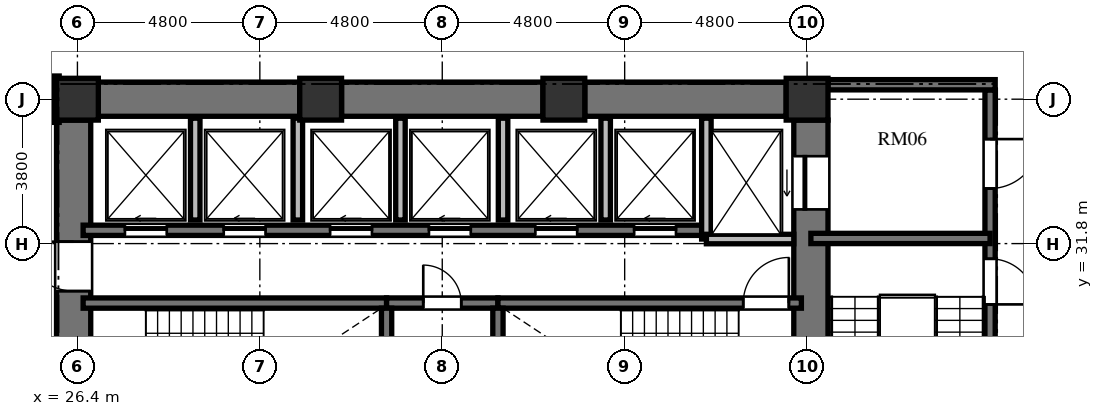
"""IFC4 building model, lengths in metres.
Left out: names, types, materials, properties, quantities, classifications, styles, units other than length and angle.
Written with IfcOpenShell. Run it as: python <this file> out.ifc"""

import sys

from ifc_helpers import new_model, si_unit, direction, frame, frame_2d, origin, origin_2d, place, context, subcontext, project, spatial, rectangle, extrude, element, fill, save


model = new_model("IFC4")
c1 = context("Model", 3, precision=1e-05, world=origin(), true_north=direction((0.0, 1.0)))
c2 = subcontext(c1, "Body", "Model", "MODEL_VIEW")
j1 = project(units=[si_unit("LENGTHUNIT", "METRE"), si_unit("PLANEANGLEUNIT", "RADIAN")], contexts=[c1])
p1 = place(None, origin())
s1 = spatial("IfcSite", under=j1, at=p1, CompositionType="ELEMENT")
p2 = place(p1, origin())
s2 = spatial("IfcBuilding", under=s1, at=p2, CompositionType="ELEMENT")
p3 = place(p2, frame((0.0, 0.0, 68.976)))
s3 = spatial("IfcBuildingStorey", under=s2, at=p3, CompositionType="ELEMENT", Elevation=68.976)
for number, where, z_axis, x_axis in (
    (1, (45.6, 35.6, 0.0), (0.0, 0.0, 1.0), (1.0, 0.0, 0.0)),
    (2, (39.2, 35.6, 0.0), (0.0, 0.0, 1.0), (1.0, 0.0, 0.0)),
    (3, (32.8, 35.6, 0.0), (0.0, 0.0, 1.0), (1.0, 0.0, 0.0)),
    (4, (26.4, 35.6, 0.0), (0.0, 0.0, 1.0), (1.0, 0.0, 0.0)),
):
    element("IfcColumn", number, at=place(p3, frame(where, z_axis=z_axis, x_axis=x_axis)), inside=s3, PredefinedType="COLUMN", context=c2, shape_type="SweptSolid", body=[
        extrude(rectangle(XDim=1.1, YDim=1.1, at=origin_2d()), origin(), (0.0, 0.0, 1.0), 3.648),
    ])
p4 = place(p3, frame((26.3, 20.95, 0.0), z_axis=(0.0, 0.0, 1.0), x_axis=(0.0, 1.0, 0.0)))
e5 = element("IfcWall", 5, at=p4, inside=s3, PredefinedType="SHEAR", context=c2, shape_type="SweptSolid", body=[
    extrude(rectangle(XDim=14.1, YDim=0.9, at=frame_2d((7.05, 0.0))), origin(), (0.0, 0.0, 1.0), 3.648),
])
p5 = place(p4, frame((6.5, 0.0, 0.0)))
e6 = element("IfcOpeningElement", 6, at=p5, cuts=e5, PredefinedType="OPENING", context=c2, shape_type="SweptSolid", body=[
    extrude(rectangle(XDim=1.2, YDim=2.15, at=frame_2d((0.6, 1.075))), frame((0.0, 0.46, 0.0), z_axis=(0.0, -1.0, 0.0), x_axis=(1.0, 0.0, 0.0)), (0.0, 0.0, 1.0), 0.92),
])
p6 = place(p4, frame((9.6, 0.0, 0.0)))
e7 = element("IfcOpeningElement", 7, at=p6, cuts=e5, PredefinedType="OPENING", context=c2, shape_type="SweptSolid", body=[
    extrude(rectangle(XDim=1.3, YDim=2.2, at=frame_2d((0.65, 1.1))), frame((0.0, 0.46, 0.0), z_axis=(0.0, -1.0, 0.0), x_axis=(1.0, 0.0, 0.0)), (0.0, 0.0, 1.0), 0.92),
])
p7 = place(p4, frame((3.26, 0.0, 0.0)))
e8 = element("IfcOpeningElement", 8, at=p7, cuts=e5, PredefinedType="OPENING", context=c2, shape_type="SweptSolid", body=[
    extrude(rectangle(XDim=1.3, YDim=2.2, at=frame_2d((0.65, 1.1))), frame((0.0, 0.46, 0.0), z_axis=(0.0, -1.0, 0.0), x_axis=(1.0, 0.0, 0.0)), (0.0, 0.0, 1.0), 0.92),
])
p8 = place(p3, frame((45.7, 20.95, 0.0), z_axis=(0.0, 0.0, 1.0), x_axis=(0.0, 1.0, 0.0)))
e9 = element("IfcWall", 9, at=p8, inside=s3, PredefinedType="SHEAR", context=c2, shape_type="SweptSolid", body=[
    extrude(rectangle(XDim=14.1, YDim=0.9, at=frame_2d((7.05, 0.0))), origin(), (0.0, 0.0, 1.0), 3.648),
])
p9 = place(p8, frame((11.75, 0.0, 0.0)))
e10 = element("IfcOpeningElement", 10, at=p9, cuts=e9, PredefinedType="OPENING", context=c2, shape_type="SweptSolid", body=[
    extrude(rectangle(XDim=1.4, YDim=2.3, at=frame_2d((0.7, 1.15))), frame((0.0, 0.46, 0.0), z_axis=(0.0, -1.0, 0.0), x_axis=(1.0, 0.0, 0.0)), (0.0, 0.0, 1.0), 0.92),
])
p10 = place(p8, frame((0.95, 0.0, 0.0)))
e11 = element("IfcOpeningElement", 11, at=p10, cuts=e9, PredefinedType="OPENING", context=c2, shape_type="SweptSolid", body=[
    extrude(rectangle(XDim=1.4, YDim=2.3, at=frame_2d((0.7, 1.15))), frame((0.0, 0.46, 0.0), z_axis=(0.0, -1.0, 0.0), x_axis=(1.0, 0.0, 0.0)), (0.0, 0.0, 1.0), 0.92),
])
p11 = place(p3, frame((26.95, 35.6, 0.0), z_axis=(0.0, 0.0, 1.0), x_axis=(1.0, 0.0, 0.0)))
e12 = element("IfcWall", 12, at=p11, inside=s3, PredefinedType="SHEAR", context=c2, shape_type="SweptSolid", body=[
    extrude(rectangle(XDim=5.3, YDim=0.9, at=frame_2d((2.65, 0.0))), origin(), (0.0, 0.0, 1.0), 3.648),
])
p12 = place(p3, frame((33.35, 35.6, 0.0), z_axis=(0.0, 0.0, 1.0), x_axis=(1.0, 0.0, 0.0)))
e13 = element("IfcWall", 13, at=p12, inside=s3, PredefinedType="SHEAR", context=c2, shape_type="SweptSolid", body=[
    extrude(rectangle(XDim=5.3, YDim=0.9, at=frame_2d((2.65, 0.0))), origin(), (0.0, 0.0, 1.0), 3.648),
])
p13 = place(p3, frame((39.75, 35.6, 0.0), z_axis=(0.0, 0.0, 1.0), x_axis=(1.0, 0.0, 0.0)))
e14 = element("IfcWall", 14, at=p13, inside=s3, PredefinedType="SHEAR", context=c2, shape_type="SweptSolid", body=[
    extrude(rectangle(XDim=5.3, YDim=0.9, at=frame_2d((2.65, 0.0))), origin(), (0.0, 0.0, 1.0), 3.648),
])
p14 = place(p3, frame((26.55, 30.235, 0.0), z_axis=(0.0, 0.0, 1.0), x_axis=(1.0, 0.0, 0.0)))
e15 = element("IfcWall", 15, at=p14, inside=s3, PredefinedType="SHEAR", context=c2, shape_type="SweptSolid", body=[
    extrude(rectangle(XDim=7.985, YDim=0.27, at=frame_2d((3.992, 0.0))), origin(), (0.0, 0.0, 1.0), 3.648),
])
p15 = place(p3, frame((34.535, 30.235, 0.0), z_axis=(0.0, 0.0, 1.0), x_axis=(1.0, 0.0, 0.0)))
e16 = element("IfcWall", 16, at=p15, inside=s3, PredefinedType="SHEAR", context=c2, shape_type="SweptSolid", body=[
    extrude(rectangle(XDim=2.93, YDim=0.27, at=frame_2d((1.465, 0.0))), origin(), (0.0, 0.0, 1.0), 3.648),
])
p16 = place(p15, frame((0.965, 0.0, 0.0)))
e17 = element("IfcOpeningElement", 17, at=p16, cuts=e16, PredefinedType="OPENING", context=c2, shape_type="SweptSolid", body=[
    extrude(rectangle(XDim=1.0, YDim=2.1, at=frame_2d((0.5, 1.05))), frame((0.0, 0.145, 0.0), z_axis=(0.0, -1.0, 0.0), x_axis=(1.0, 0.0, 0.0)), (0.0, 0.0, 1.0), 0.29),
])
p17 = place(p3, frame((37.465, 30.235, 0.0), z_axis=(0.0, 0.0, 1.0), x_axis=(1.0, 0.0, 0.0)))
e18 = element("IfcWall", 18, at=p17, inside=s3, PredefinedType="SHEAR", context=c2, shape_type="SweptSolid", body=[
    extrude(rectangle(XDim=7.985, YDim=0.27, at=frame_2d((3.992, 0.0))), origin(), (0.0, 0.0, 1.0), 3.648),
])
p18 = place(p17, frame((6.455, 0.0, 0.0)))
e19 = element("IfcOpeningElement", 19, at=p18, cuts=e18, PredefinedType="OPENING", context=c2, shape_type="SweptSolid", body=[
    extrude(rectangle(XDim=1.2, YDim=2.15, at=frame_2d((0.6, 1.075))), frame((0.0, 0.145, 0.0), z_axis=(0.0, -1.0, 0.0), x_axis=(1.0, 0.0, 0.0)), (0.0, 0.0, 1.0), 0.29),
])
for number, where, z_axis, x_axis in (
    (20, (34.535, 26.02, 0.0), (0.0, 0.0, 1.0), (0.0, 1.0, 0.0)),
    (21, (37.465, 26.02, 0.0), (0.0, 0.0, 1.0), (0.0, 1.0, 0.0)),
):
    element("IfcWall", number, at=place(p3, frame(where, z_axis=z_axis, x_axis=x_axis)), inside=s3, PredefinedType="SHEAR", context=c2, shape_type="SweptSolid", body=[
        extrude(rectangle(XDim=4.08, YDim=0.27, at=frame_2d((2.04, 0.0))), origin(), (0.0, 0.0, 1.0), 3.648),
    ])
p19 = place(p3, frame((26.55, 32.15, 0.0), z_axis=(0.0, 0.0, 1.0), x_axis=(1.0, 0.0, 0.0)))
e22 = element("IfcWall", 22, at=p19, inside=s3, PredefinedType="SHEAR", context=c2, shape_type="SweptSolid", body=[
    extrude(rectangle(XDim=16.4, YDim=0.27, at=frame_2d((8.2, 0.0))), origin(), (0.0, 0.0, 1.0), 3.648),
])
p20 = place(p19, frame((1.1, 0.0, 0.0)))
e23 = element("IfcOpeningElement", 23, at=p20, cuts=e22, PredefinedType="OPENING", context=c2, shape_type="SweptSolid", body=[
    extrude(rectangle(XDim=1.1, YDim=2.2, at=frame_2d((0.55, 1.1))), frame((0.0, 0.145, 0.0), z_axis=(0.0, -1.0, 0.0), x_axis=(1.0, 0.0, 0.0)), (0.0, 0.0, 1.0), 0.29),
])
p21 = place(p19, frame((3.7, 0.0, 0.0)))
e24 = element("IfcOpeningElement", 24, at=p21, cuts=e22, PredefinedType="OPENING", context=c2, shape_type="SweptSolid", body=[
    extrude(rectangle(XDim=1.1, YDim=2.2, at=frame_2d((0.55, 1.1))), frame((0.0, 0.145, 0.0), z_axis=(0.0, -1.0, 0.0), x_axis=(1.0, 0.0, 0.0)), (0.0, 0.0, 1.0), 0.29),
])
p22 = place(p19, frame((6.5, 0.0, 0.0)))
e25 = element("IfcOpeningElement", 25, at=p22, cuts=e22, PredefinedType="OPENING", context=c2, shape_type="SweptSolid", body=[
    extrude(rectangle(XDim=1.1, YDim=2.2, at=frame_2d((0.55, 1.1))), frame((0.0, 0.145, 0.0), z_axis=(0.0, -1.0, 0.0), x_axis=(1.0, 0.0, 0.0)), (0.0, 0.0, 1.0), 0.29),
])
p23 = place(p19, frame((9.1, 0.0, 0.0)))
e26 = element("IfcOpeningElement", 26, at=p23, cuts=e22, PredefinedType="OPENING", context=c2, shape_type="SweptSolid", body=[
    extrude(rectangle(XDim=1.1, YDim=2.2, at=frame_2d((0.55, 1.1))), frame((0.0, 0.145, 0.0), z_axis=(0.0, -1.0, 0.0), x_axis=(1.0, 0.0, 0.0)), (0.0, 0.0, 1.0), 0.29),
])
p24 = place(p19, frame((11.9, 0.0, 0.0)))
e27 = element("IfcOpeningElement", 27, at=p24, cuts=e22, PredefinedType="OPENING", context=c2, shape_type="SweptSolid", body=[
    extrude(rectangle(XDim=1.1, YDim=2.2, at=frame_2d((0.55, 1.1))), frame((0.0, 0.145, 0.0), z_axis=(0.0, -1.0, 0.0), x_axis=(1.0, 0.0, 0.0)), (0.0, 0.0, 1.0), 0.29),
])
p25 = place(p19, frame((14.5, 0.0, 0.0)))
e28 = element("IfcOpeningElement", 28, at=p25, cuts=e22, PredefinedType="OPENING", context=c2, shape_type="SweptSolid", body=[
    extrude(rectangle(XDim=1.1, YDim=2.2, at=frame_2d((0.55, 1.1))), frame((0.0, 0.145, 0.0), z_axis=(0.0, -1.0, 0.0), x_axis=(1.0, 0.0, 0.0)), (0.0, 0.0, 1.0), 0.29),
])
p26 = place(p3, frame((42.95, 31.92, 0.0), z_axis=(0.0, 0.0, 1.0), x_axis=(0.0, 1.0, 0.0)))
e29 = element("IfcWall", 29, at=p26, inside=s3, PredefinedType="SOLIDWALL", context=c2, shape_type="SweptSolid", body=[
    extrude(rectangle(XDim=3.18, YDim=0.25, at=frame_2d((1.59, 0.0))), origin(), (0.0, 0.0, 1.0), 3.428),
])
p27 = place(p3, frame((42.95, 31.92, 0.0), z_axis=(0.0, 0.0, 1.0), x_axis=(1.0, 0.0, 0.0)))
e30 = element("IfcWall", 30, at=p27, inside=s3, PredefinedType="SOLIDWALL", context=c2, shape_type="SweptSolid", body=[
    extrude(rectangle(XDim=2.3, YDim=0.25, at=frame_2d((1.15, 0.0))), origin(), (0.0, 0.0, 1.0), 3.428),
])
for number, where, z_axis, x_axis in (
    (31, (29.5, 32.42, 0.0), (0.0, 0.0, 1.0), (0.0, 1.0, 0.0)),
    (32, (32.2, 32.42, 0.0), (0.0, 0.0, 1.0), (0.0, 1.0, 0.0)),
    (33, (34.9, 32.42, 0.0), (0.0, 0.0, 1.0), (0.0, 1.0, 0.0)),
    (34, (37.6, 32.42, 0.0), (0.0, 0.0, 1.0), (0.0, 1.0, 0.0)),
    (35, (40.3, 32.42, 0.0), (0.0, 0.0, 1.0), (0.0, 1.0, 0.0)),
):
    element("IfcWall", number, at=place(p3, frame(where, z_axis=z_axis, x_axis=x_axis)), inside=s3, PredefinedType="SOLIDWALL", context=c2, shape_type="SweptSolid", body=[
        extrude(rectangle(XDim=2.68, YDim=0.25, at=frame_2d((1.34, 0.0))), origin(), (0.0, 0.0, 1.0), 3.428),
    ])
p28 = place(p3, frame((50.415, 35.845, 0.0), z_axis=(0.0, 0.0, 1.0), x_axis=(0.0, -1.0, 0.0)))
e36 = element("IfcWall", 36, at=p28, inside=s3, PredefinedType="SHEAR", context=c2, shape_type="SweptSolid", body=[
    extrude(rectangle(XDim=15.825, YDim=0.27, at=frame_2d((7.913, 0.0))), origin(), (0.0, 0.0, 1.0), 3.648),
])
p29 = place(p28, frame((4.445, 0.0, 0.0)))
e37 = element("IfcOpeningElement", 37, at=p29, cuts=e36, PredefinedType="OPENING", context=c2, shape_type="SweptSolid", body=[
    extrude(rectangle(XDim=1.2, YDim=2.15, at=frame_2d((0.6, 1.075))), frame((0.0, 0.145, 0.0), z_axis=(0.0, -1.0, 0.0), x_axis=(1.0, 0.0, 0.0)), (0.0, 0.0, 1.0), 0.29),
])
p30 = place(p28, frame((1.295, 0.0, 0.0)))
e38 = element("IfcOpeningElement", 38, at=p30, cuts=e36, PredefinedType="OPENING", context=c2, shape_type="SweptSolid", body=[
    extrude(rectangle(XDim=1.3, YDim=2.2, at=frame_2d((0.65, 1.1))), frame((0.0, 0.145, 0.0), z_axis=(0.0, -1.0, 0.0), x_axis=(1.0, 0.0, 0.0)), (0.0, 0.0, 1.0), 0.29),
])
p31 = place(p28, frame((13.095, 0.0, 0.0)))
e39 = element("IfcOpeningElement", 39, at=p31, cuts=e36, PredefinedType="OPENING", context=c2, shape_type="SweptSolid", body=[
    extrude(rectangle(XDim=1.3, YDim=2.2, at=frame_2d((0.65, 1.1))), frame((0.0, 0.145, 0.0), z_axis=(0.0, -1.0, 0.0), x_axis=(1.0, 0.0, 0.0)), (0.0, 0.0, 1.0), 0.29),
])
p32 = place(p3, frame((46.15, 35.98, 0.0), z_axis=(0.0, 0.0, 1.0), x_axis=(1.0, 0.0, 0.0)))
e40 = element("IfcWall", 40, at=p32, inside=s3, PredefinedType="SHEAR", context=c2, shape_type="SweptSolid", body=[
    extrude(rectangle(XDim=4.4, YDim=0.27, at=frame_2d((2.2, 0.0))), origin(), (0.0, 0.0, 1.0), 3.648),
])
p33 = place(p3, frame((45.7, 31.935, 0.0), z_axis=(0.0, 0.0, 1.0), x_axis=(1.0, 0.0, 0.0)))
e41 = element("IfcWall", 41, at=p33, inside=s3, PredefinedType="SHEAR", context=c2, shape_type="SweptSolid", body=[
    extrude(rectangle(XDim=4.715, YDim=0.27, at=frame_2d((2.357, 0.0))), origin(), (0.0, 0.0, 1.0), 3.648),
])
p34 = place(p3, frame((25.83, 36.21, 0.0), z_axis=(0.0, 0.0, 1.0), x_axis=(0.0, -1.0, 0.0)))
e42 = element("IfcWall", 42, at=p34, inside=s3, PredefinedType="PARTITIONING", context=c2, shape_type="SweptSolid", body=[
    extrude(rectangle(XDim=1.22, YDim=0.18, at=frame_2d((0.61, 0.0))), origin(), (0.0, 0.0, 1.0), 3.428),
])
p35 = place(p18, origin())
e43 = element("IfcDoor", 43, at=p35, inside=s3, OperationType="SINGLE_SWING_RIGHT", PredefinedType="DOOR", context=c2, shape_type="SweptSolid", body=[
    extrude(rectangle(XDim=1.2, YDim=2.15, at=frame_2d((0.6, 1.075))), frame((0.0, 0.025, 0.0), z_axis=(0.0, -1.0, 0.0), x_axis=(1.0, 0.0, 0.0)), (0.0, 0.0, 1.0), 0.05),
])
fill(e19, e43)
p36 = place(p16, origin())
e44 = element("IfcDoor", 44, at=p36, inside=s3, OperationType="SINGLE_SWING_LEFT", PredefinedType="DOOR", context=c2, shape_type="SweptSolid", body=[
    extrude(rectangle(XDim=1.0, YDim=2.1, at=frame_2d((0.5, 1.05))), frame((0.0, 0.025, 0.0), z_axis=(0.0, -1.0, 0.0), x_axis=(1.0, 0.0, 0.0)), (0.0, 0.0, 1.0), 0.05),
])
fill(e17, e44)
p37 = place(p6, origin())
e45 = element("IfcDoor", 45, at=p37, inside=s3, OperationType="SINGLE_SWING_RIGHT", PredefinedType="DOOR", context=c2, shape_type="SweptSolid", body=[
    extrude(rectangle(XDim=1.3, YDim=2.2, at=frame_2d((0.65, 1.1))), frame((0.0, 0.025, 0.0), z_axis=(0.0, -1.0, 0.0), x_axis=(1.0, 0.0, 0.0)), (0.0, 0.0, 1.0), 0.05),
])
fill(e7, e45)
p38 = place(p20, origin())
e46 = element("IfcDoor", 46, at=p38, inside=s3, OperationType="SLIDING_TO_LEFT", PredefinedType="DOOR", context=c2, shape_type="SweptSolid", body=[
    extrude(rectangle(XDim=1.1, YDim=2.2, at=frame_2d((0.55, 1.1))), frame((0.0, 0.025, 0.0), z_axis=(0.0, -1.0, 0.0), x_axis=(1.0, 0.0, 0.0)), (0.0, 0.0, 1.0), 0.05),
])
fill(e23, e46)
p39 = place(p21, origin())
e47 = element("IfcDoor", 47, at=p39, inside=s3, OperationType="SLIDING_TO_LEFT", PredefinedType="DOOR", context=c2, shape_type="SweptSolid", body=[
    extrude(rectangle(XDim=1.1, YDim=2.2, at=frame_2d((0.55, 1.1))), frame((0.0, 0.025, 0.0), z_axis=(0.0, -1.0, 0.0), x_axis=(1.0, 0.0, 0.0)), (0.0, 0.0, 1.0), 0.05),
])
fill(e24, e47)
p40 = place(p22, origin())
e48 = element("IfcDoor", 48, at=p40, inside=s3, OperationType="SLIDING_TO_LEFT", PredefinedType="DOOR", context=c2, shape_type="SweptSolid", body=[
    extrude(rectangle(XDim=1.1, YDim=2.2, at=frame_2d((0.55, 1.1))), frame((0.0, 0.025, 0.0), z_axis=(0.0, -1.0, 0.0), x_axis=(1.0, 0.0, 0.0)), (0.0, 0.0, 1.0), 0.05),
])
fill(e25, e48)
p41 = place(p23, origin())
e49 = element("IfcDoor", 49, at=p41, inside=s3, OperationType="SLIDING_TO_LEFT", PredefinedType="DOOR", context=c2, shape_type="SweptSolid", body=[
    extrude(rectangle(XDim=1.1, YDim=2.2, at=frame_2d((0.55, 1.1))), frame((0.0, 0.025, 0.0), z_axis=(0.0, -1.0, 0.0), x_axis=(1.0, 0.0, 0.0)), (0.0, 0.0, 1.0), 0.05),
])
fill(e26, e49)
p42 = place(p24, origin())
e50 = element("IfcDoor", 50, at=p42, inside=s3, OperationType="SLIDING_TO_LEFT", PredefinedType="DOOR", context=c2, shape_type="SweptSolid", body=[
    extrude(rectangle(XDim=1.1, YDim=2.2, at=frame_2d((0.55, 1.1))), frame((0.0, 0.025, 0.0), z_axis=(0.0, -1.0, 0.0), x_axis=(1.0, 0.0, 0.0)), (0.0, 0.0, 1.0), 0.05),
])
fill(e27, e50)
p43 = place(p25, origin())
e51 = element("IfcDoor", 51, at=p43, inside=s3, OperationType="SLIDING_TO_LEFT", PredefinedType="DOOR", context=c2, shape_type="SweptSolid", body=[
    extrude(rectangle(XDim=1.1, YDim=2.2, at=frame_2d((0.55, 1.1))), frame((0.0, 0.025, 0.0), z_axis=(0.0, -1.0, 0.0), x_axis=(1.0, 0.0, 0.0)), (0.0, 0.0, 1.0), 0.05),
])
fill(e28, e51)
p44 = place(p9, origin())
e52 = element("IfcDoor", 52, at=p44, inside=s3, OperationType="SLIDING_TO_LEFT", PredefinedType="DOOR", context=c2, shape_type="SweptSolid", body=[
    extrude(rectangle(XDim=1.4, YDim=2.3, at=frame_2d((0.7, 1.15))), frame((0.0, 0.025, 0.0), z_axis=(0.0, -1.0, 0.0), x_axis=(1.0, 0.0, 0.0)), (0.0, 0.0, 1.0), 0.05),
])
fill(e10, e52)
p45 = place(p29, origin())
e53 = element("IfcDoor", 53, at=p45, inside=s3, OperationType="SINGLE_SWING_RIGHT", PredefinedType="DOOR", context=c2, shape_type="SweptSolid", body=[
    extrude(rectangle(XDim=1.2, YDim=2.15, at=frame_2d((0.6, 1.075))), frame((0.0, 0.025, 0.0), z_axis=(0.0, -1.0, 0.0), x_axis=(1.0, 0.0, 0.0)), (0.0, 0.0, 1.0), 0.05),
])
fill(e37, e53)
p46 = place(p30, origin())
e54 = element("IfcDoor", 54, at=p46, inside=s3, OperationType="SINGLE_SWING_LEFT", PredefinedType="DOOR", context=c2, shape_type="SweptSolid", body=[
    extrude(rectangle(XDim=1.3, YDim=2.2, at=frame_2d((0.65, 1.1))), frame((0.0, 0.025, 0.0), z_axis=(0.0, -1.0, 0.0), x_axis=(1.0, 0.0, 0.0)), (0.0, 0.0, 1.0), 0.05),
])
fill(e38, e54)
save(model, sys.argv[1])
